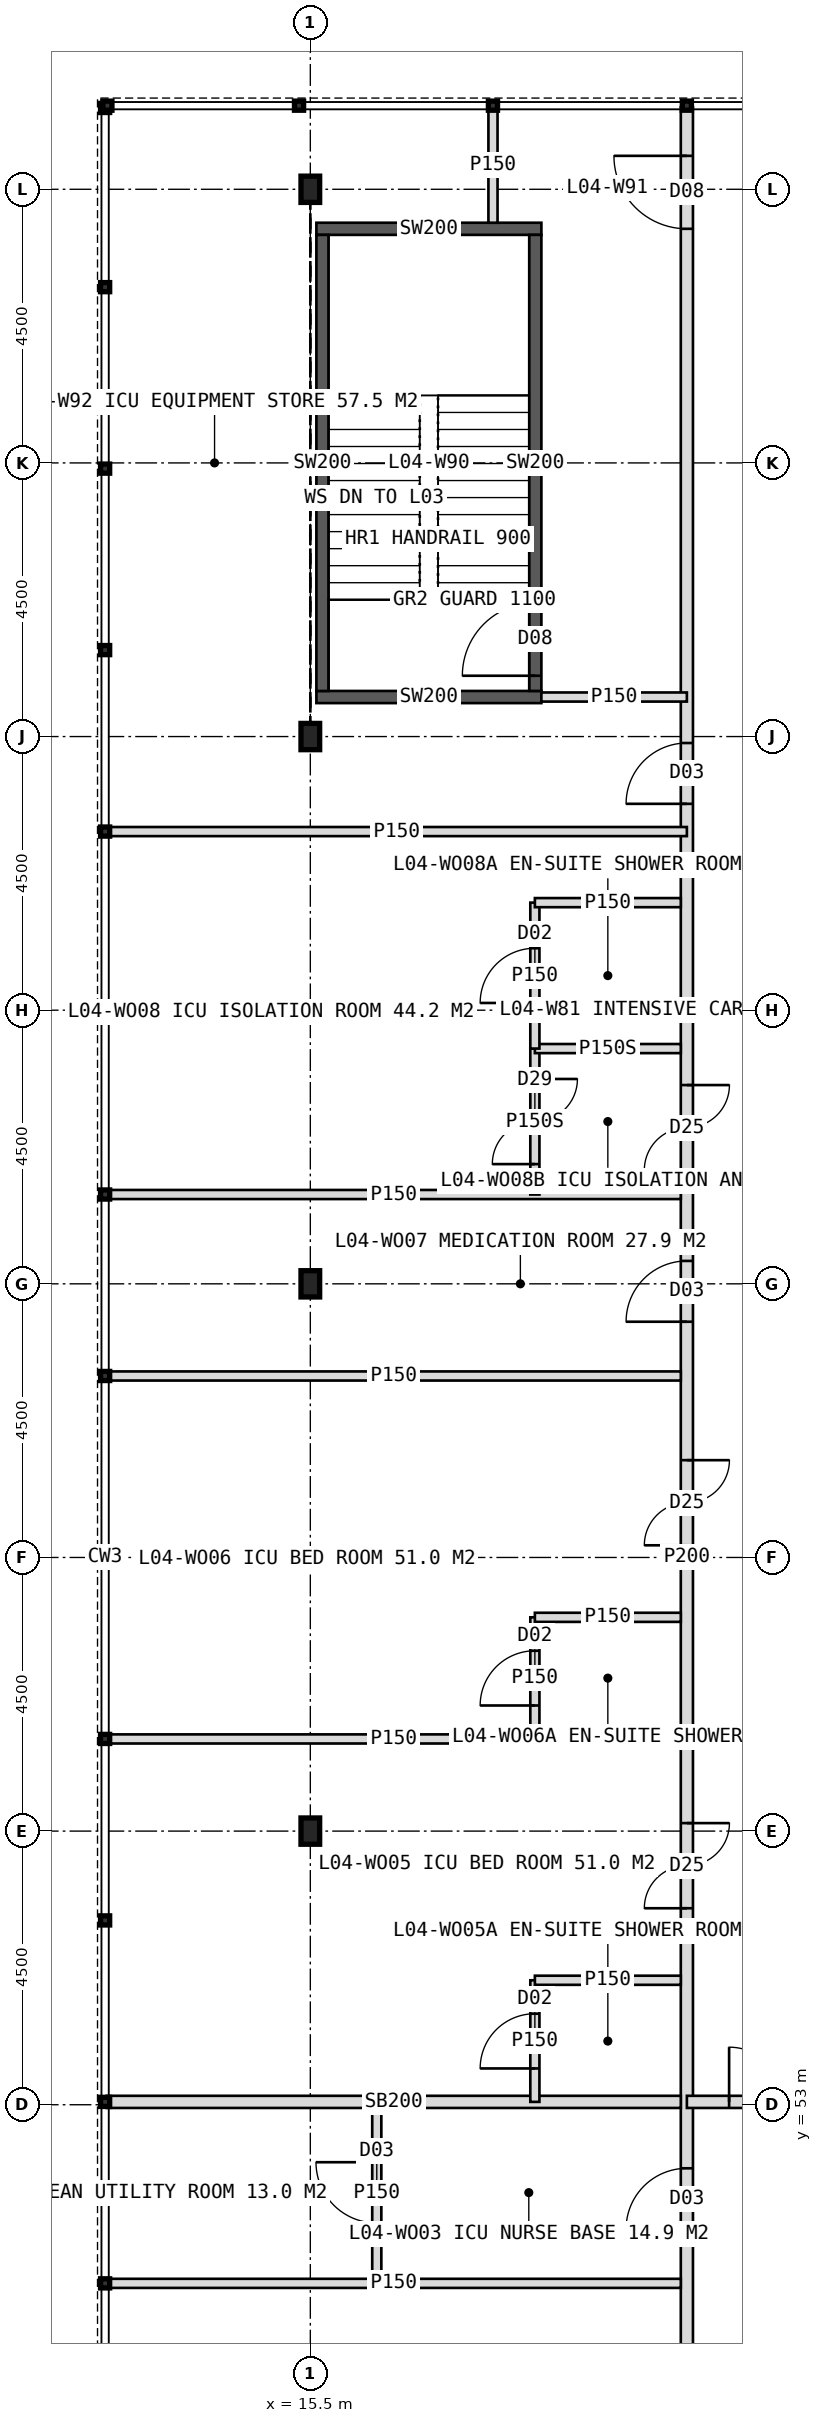
"""IFC4 building model, lengths in metres.
Left out: names, types, materials, properties, quantities, classifications, styles, units other than length and angle.
Written with IfcOpenShell. Run it as: python <this file> out.ifc"""

import sys

from ifc_helpers import new_model, si_unit, direction, frame, frame_2d, origin, origin_2d, place, context, subcontext, project, spatial, rectangle, i_section, extrude, element, fill, save


model = new_model("IFC4")
c1 = context("Model", 3, precision=1e-05, world=origin(), true_north=direction((0.0, 1.0)))
c2 = subcontext(c1, "Body", "Model", "MODEL_VIEW")
j1 = project(units=[si_unit("LENGTHUNIT", "METRE"), si_unit("PLANEANGLEUNIT", "RADIAN")], contexts=[c1])
p1 = place(None, origin())
s1 = spatial("IfcSite", under=j1, at=p1, CompositionType="ELEMENT")
p2 = place(p1, origin())
s2 = spatial("IfcBuilding", under=s1, at=p2, CompositionType="ELEMENT")
p3 = place(p2, frame((0.0, 0.0, 21.0)))
s3 = spatial("IfcBuildingStorey", under=s2, at=p3, CompositionType="ELEMENT", Elevation=21.0)
for number, where, z_axis, x_axis in (
    (1, (15.5, 57.5, 0.0), (0.0, 0.0, 1.0), (1.0, 0.0, 0.0)),
    (2, (15.5, 66.5, 0.0), (0.0, 0.0, 1.0), (1.0, 0.0, 0.0)),
    (3, (15.5, 75.5, 0.0), (0.0, 0.0, 1.0), (1.0, 0.0, 0.0)),
    (4, (15.5, 84.5, 0.0), (0.0, 0.0, 1.0), (1.0, 0.0, 0.0)),
):
    element("IfcColumn", number, at=place(p3, frame(where, z_axis=z_axis, x_axis=x_axis)), inside=s3, PredefinedType="COLUMN", context=c2, shape_type="SweptSolid", body=[
        extrude(i_section(OverallWidth=0.307, OverallDepth=0.432, WebThickness=0.021, FlangeThickness=0.04, FilletRadius=0.027, at=origin_2d()), origin(), (0.0, 0.0, 1.0), 5.0),
    ])
p4 = place(p3, frame((21.693, 38.15, 0.0), z_axis=(0.0, 0.0, 1.0), x_axis=(0.0, 1.0, 0.0)))
e5 = element("IfcWall", 5, at=p4, inside=s3, PredefinedType="PARTITIONING", context=c2, shape_type="SweptSolid", body=[
    extrude(rectangle(XDim=47.7, YDim=0.2, at=frame_2d((23.85, 0.0))), origin(), (0.0, 0.0, 1.0), 4.7),
])
p5 = place(p4, frame((45.7, 0.0, 0.0)))
e6 = element("IfcOpeningElement", 6, at=p5, cuts=e5, PredefinedType="OPENING", context=c2, shape_type="SweptSolid", body=[
    extrude(rectangle(XDim=1.2, YDim=2.1, at=frame_2d((0.6, 1.05))), frame((0.0, 0.11, 0.0), z_axis=(0.0, -1.0, 0.0), x_axis=(1.0, 0.0, 0.0)), (0.0, 0.0, 1.0), 0.22),
])
p6 = place(p4, frame((36.244, 0.0, 0.0)))
e7 = element("IfcOpeningElement", 7, at=p6, cuts=e5, PredefinedType="OPENING", context=c2, shape_type="SweptSolid", body=[
    extrude(rectangle(XDim=1.0, YDim=2.1, at=frame_2d((0.5, 1.05))), frame((0.0, 0.11, 0.0), z_axis=(0.0, -1.0, 0.0), x_axis=(1.0, 0.0, 0.0)), (0.0, 0.0, 1.0), 0.22),
])
p7 = place(p4, frame((0.5, 0.0, 0.0)))
e8 = element("IfcOpeningElement", 8, at=p7, cuts=e5, PredefinedType="OPENING", context=c2, shape_type="SweptSolid", body=[
    extrude(rectangle(XDim=1.4, YDim=2.2, at=frame_2d((0.7, 1.1))), frame((0.0, 0.11, 0.0), z_axis=(0.0, -1.0, 0.0), x_axis=(1.0, 0.0, 0.0)), (0.0, 0.0, 1.0), 0.22),
])
p8 = place(p4, frame((30.219, 0.0, 0.0)))
e9 = element("IfcOpeningElement", 9, at=p8, cuts=e5, PredefinedType="OPENING", context=c2, shape_type="SweptSolid", body=[
    extrude(rectangle(XDim=1.4, YDim=2.2, at=frame_2d((0.7, 1.1))), frame((0.0, 0.11, 0.0), z_axis=(0.0, -1.0, 0.0), x_axis=(1.0, 0.0, 0.0)), (0.0, 0.0, 1.0), 0.22),
])
p9 = place(p4, frame((9.128, 0.0, 0.0)))
e10 = element("IfcOpeningElement", 10, at=p9, cuts=e5, PredefinedType="OPENING", context=c2, shape_type="SweptSolid", body=[
    extrude(rectangle(XDim=1.4, YDim=2.2, at=frame_2d((0.7, 1.1))), frame((0.0, 0.11, 0.0), z_axis=(0.0, -1.0, 0.0), x_axis=(1.0, 0.0, 0.0)), (0.0, 0.0, 1.0), 0.22),
])
p10 = place(p4, frame((12.805, 0.0, 0.0)))
e11 = element("IfcOpeningElement", 11, at=p10, cuts=e5, PredefinedType="OPENING", context=c2, shape_type="SweptSolid", body=[
    extrude(rectangle(XDim=1.0, YDim=2.1, at=frame_2d((0.5, 1.05))), frame((0.0, 0.11, 0.0), z_axis=(0.0, -1.0, 0.0), x_axis=(1.0, 0.0, 0.0)), (0.0, 0.0, 1.0), 0.22),
])
p11 = place(p4, frame((18.081, 0.0, 0.0)))
e12 = element("IfcOpeningElement", 12, at=p11, cuts=e5, PredefinedType="OPENING", context=c2, shape_type="SweptSolid", body=[
    extrude(rectangle(XDim=1.4, YDim=2.2, at=frame_2d((0.7, 1.1))), frame((0.0, 0.11, 0.0), z_axis=(0.0, -1.0, 0.0), x_axis=(1.0, 0.0, 0.0)), (0.0, 0.0, 1.0), 0.22),
])
p12 = place(p4, frame((24.05, 0.0, 0.0)))
e13 = element("IfcOpeningElement", 13, at=p12, cuts=e5, PredefinedType="OPENING", context=c2, shape_type="SweptSolid", body=[
    extrude(rectangle(XDim=1.4, YDim=2.2, at=frame_2d((0.7, 1.1))), frame((0.0, 0.11, 0.0), z_axis=(0.0, -1.0, 0.0), x_axis=(1.0, 0.0, 0.0)), (0.0, 0.0, 1.0), 0.22),
])
p13 = place(p4, frame((27.727, 0.0, 0.0)))
e14 = element("IfcOpeningElement", 14, at=p13, cuts=e5, PredefinedType="OPENING", context=c2, shape_type="SweptSolid", body=[
    extrude(rectangle(XDim=1.0, YDim=2.1, at=frame_2d((0.5, 1.05))), frame((0.0, 0.11, 0.0), z_axis=(0.0, -1.0, 0.0), x_axis=(1.0, 0.0, 0.0)), (0.0, 0.0, 1.0), 0.22),
])
p14 = place(p3, frame((21.693, 53.047, 0.0), z_axis=(0.0, 0.0, 1.0), x_axis=(1.0, 0.0, 0.0)))
e15 = element("IfcWall", 15, at=p14, inside=s3, PredefinedType="SOLIDWALL", context=c2, shape_type="SweptSolid", body=[
    extrude(rectangle(XDim=3.189, YDim=0.2, at=frame_2d((1.594, 0.0))), origin(), (0.0, 0.0, 1.0), 4.7),
])
p15 = place(p14, frame((0.695, 0.0, 0.0)))
e16 = element("IfcOpeningElement", 16, at=p15, cuts=e15, PredefinedType="OPENING", context=c2, shape_type="SweptSolid", body=[
    extrude(rectangle(XDim=1.8, YDim=2.2, at=frame_2d((0.9, 1.1))), frame((0.0, 0.11, 0.0), z_axis=(0.0, -1.0, 0.0), x_axis=(1.0, 0.0, 0.0)), (0.0, 0.0, 1.0), 0.22),
])
for number, where, z_axis, x_axis in (
    (17, (15.6, 76.15, 0.0), (0.0, 0.0, 1.0), (1.0, 0.0, 0.0)),
    (18, (15.6, 83.85, 0.0), (0.0, 0.0, 1.0), (1.0, 0.0, 0.0)),
):
    element("IfcWall", number, at=place(p3, frame(where, z_axis=z_axis, x_axis=x_axis)), inside=s3, PredefinedType="SOLIDWALL", context=c2, shape_type="SweptSolid", body=[
        extrude(rectangle(XDim=3.7, YDim=0.2, at=frame_2d((1.85, 0.0))), origin(), (0.0, 0.0, 1.0), 4.7),
    ])
p16 = place(p3, frame((15.7, 76.25, 0.0), z_axis=(0.0, 0.0, 1.0), x_axis=(0.0, 1.0, 0.0)))
e19 = element("IfcWall", 19, at=p16, inside=s3, PredefinedType="SOLIDWALL", context=c2, shape_type="SweptSolid", body=[
    extrude(rectangle(XDim=7.5, YDim=0.2, at=frame_2d((3.75, 0.0))), origin(), (0.0, 0.0, 1.0), 4.7),
])
p17 = place(p3, frame((19.2, 76.25, 0.0), z_axis=(0.0, 0.0, 1.0), x_axis=(0.0, 1.0, 0.0)))
e20 = element("IfcWall", 20, at=p17, inside=s3, PredefinedType="SOLIDWALL", context=c2, shape_type="SweptSolid", body=[
    extrude(rectangle(XDim=7.5, YDim=0.2, at=frame_2d((3.75, 0.0))), origin(), (0.0, 0.0, 1.0), 4.7),
])
p18 = place(p17, frame((0.25, 0.0, 0.0)))
e21 = element("IfcOpeningElement", 21, at=p18, cuts=e20, PredefinedType="OPENING", context=c2, shape_type="SweptSolid", body=[
    extrude(rectangle(XDim=1.2, YDim=2.1, at=frame_2d((0.6, 1.05))), frame((0.0, 0.11, 0.0), z_axis=(0.0, -1.0, 0.0), x_axis=(1.0, 0.0, 0.0)), (0.0, 0.0, 1.0), 0.22),
])
p19 = place(p3, frame((19.3, 76.15, 0.0), z_axis=(0.0, 0.0, 1.0), x_axis=(1.0, 0.0, 0.0)))
e22 = element("IfcWall", 22, at=p19, inside=s3, PredefinedType="PARTITIONING", context=c2, shape_type="SweptSolid", body=[
    extrude(rectangle(XDim=2.393, YDim=0.15, at=frame_2d((1.197, 0.0))), origin(), (0.0, 0.0, 1.0), 4.7),
])
p20 = place(p3, frame((18.504, 83.95, 0.0), z_axis=(0.0, 0.0, 1.0), x_axis=(0.0, 1.0, 0.0)))
e23 = element("IfcWall", 23, at=p20, inside=s3, PredefinedType="PARTITIONING", context=c2, shape_type="SweptSolid", body=[
    extrude(rectangle(XDim=1.9, YDim=0.15, at=frame_2d((0.95, 0.0))), origin(), (0.0, 0.0, 1.0), 4.7),
])
p21 = place(p3, frame((12.15, 73.938, 0.0), z_axis=(0.0, 0.0, 1.0), x_axis=(1.0, 0.0, 0.0)))
e24 = element("IfcWall", 24, at=p21, inside=s3, PredefinedType="PARTITIONING", context=c2, shape_type="SweptSolid", body=[
    extrude(rectangle(XDim=9.543, YDim=0.15, at=frame_2d((4.771, 0.0))), origin(), (0.0, 0.0, 1.0), 4.7),
])
p22 = place(p3, frame((12.15, 50.062, 0.0), z_axis=(0.0, 0.0, 1.0), x_axis=(1.0, 0.0, 0.0)))
e25 = element("IfcWall", 25, at=p22, inside=s3, PredefinedType="PARTITIONING", context=c2, shape_type="SweptSolid", body=[
    extrude(rectangle(XDim=9.443, YDim=0.15, at=frame_2d((4.722, 0.0))), origin(), (0.0, 0.0, 1.0), 4.7),
])
p23 = place(p3, frame((12.15, 53.047, 0.0), z_axis=(0.0, 0.0, 1.0), x_axis=(1.0, 0.0, 0.0)))
e26 = element("IfcWall", 26, at=p23, inside=s3, PredefinedType="SOLIDWALL", context=c2, shape_type="SweptSolid", body=[
    extrude(rectangle(XDim=9.443, YDim=0.2, at=frame_2d((4.722, 0.0))), origin(), (0.0, 0.0, 1.0), 4.7),
])
for number, where, z_axis, x_axis in (
    (27, (12.15, 59.016, 0.0), (0.0, 0.0, 1.0), (1.0, 0.0, 0.0)),
    (28, (12.15, 64.984, 0.0), (0.0, 0.0, 1.0), (1.0, 0.0, 0.0)),
    (29, (12.15, 67.969, 0.0), (0.0, 0.0, 1.0), (1.0, 0.0, 0.0)),
):
    element("IfcWall", number, at=place(p3, frame(where, z_axis=z_axis, x_axis=x_axis)), inside=s3, PredefinedType="PARTITIONING", context=c2, shape_type="SweptSolid", body=[
        extrude(rectangle(XDim=9.443, YDim=0.15, at=frame_2d((4.722, 0.0))), origin(), (0.0, 0.0, 1.0), 4.7),
    ])
p24 = place(p3, frame((16.593, 50.062, 0.0), z_axis=(0.0, 0.0, 1.0), x_axis=(0.0, 1.0, 0.0)))
e30 = element("IfcWall", 30, at=p24, inside=s3, PredefinedType="PARTITIONING", context=c2, shape_type="SweptSolid", body=[
    extrude(rectangle(XDim=2.984, YDim=0.15, at=frame_2d((1.492, 0.0))), origin(), (0.0, 0.0, 1.0), 4.7),
])
p25 = place(p24, frame((0.992, 0.0, 0.0)))
e31 = element("IfcOpeningElement", 31, at=p25, cuts=e30, PredefinedType="OPENING", context=c2, shape_type="SweptSolid", body=[
    extrude(rectangle(XDim=1.0, YDim=2.1, at=frame_2d((0.5, 1.05))), frame((0.0, 0.085, 0.0), z_axis=(0.0, -1.0, 0.0), x_axis=(1.0, 0.0, 0.0)), (0.0, 0.0, 1.0), 0.17),
])
p26 = place(p3, frame((19.193, 53.047, 0.0), z_axis=(0.0, 0.0, 1.0), x_axis=(0.0, 1.0, 0.0)))
e32 = element("IfcWall", 32, at=p26, inside=s3, PredefinedType="PARTITIONING", context=c2, shape_type="SweptSolid", body=[
    extrude(rectangle(XDim=2.0, YDim=0.15, at=frame_2d((1.0, 0.0))), origin(), (0.0, 0.0, 1.0), 4.7),
])
p27 = place(p26, frame((0.55, 0.0, 0.0)))
e33 = element("IfcOpeningElement", 33, at=p27, cuts=e32, PredefinedType="OPENING", context=c2, shape_type="SweptSolid", body=[
    extrude(rectangle(XDim=0.9, YDim=2.1, at=frame_2d((0.45, 1.05))), frame((0.0, 0.085, 0.0), z_axis=(0.0, -1.0, 0.0), x_axis=(1.0, 0.0, 0.0)), (0.0, 0.0, 1.0), 0.17),
])
p28 = place(p3, frame((21.593, 55.047, 0.0), z_axis=(0.0, 0.0, 1.0), x_axis=(-1.0, 0.0, 0.0)))
e34 = element("IfcWall", 34, at=p28, inside=s3, PredefinedType="PARTITIONING", context=c2, shape_type="SweptSolid", body=[
    extrude(rectangle(XDim=2.4, YDim=0.15, at=frame_2d((1.2, 0.0))), origin(), (0.0, 0.0, 1.0), 4.7),
])
p29 = place(p3, frame((19.193, 59.016, 0.0), z_axis=(0.0, 0.0, 1.0), x_axis=(0.0, 1.0, 0.0)))
e35 = element("IfcWall", 35, at=p29, inside=s3, PredefinedType="PARTITIONING", context=c2, shape_type="SweptSolid", body=[
    extrude(rectangle(XDim=2.0, YDim=0.15, at=frame_2d((1.0, 0.0))), origin(), (0.0, 0.0, 1.0), 4.7),
])
p30 = place(p29, frame((0.55, 0.0, 0.0)))
e36 = element("IfcOpeningElement", 36, at=p30, cuts=e35, PredefinedType="OPENING", context=c2, shape_type="SweptSolid", body=[
    extrude(rectangle(XDim=0.9, YDim=2.1, at=frame_2d((0.45, 1.05))), frame((0.0, 0.085, 0.0), z_axis=(0.0, -1.0, 0.0), x_axis=(1.0, 0.0, 0.0)), (0.0, 0.0, 1.0), 0.17),
])
p31 = place(p3, frame((21.593, 61.016, 0.0), z_axis=(0.0, 0.0, 1.0), x_axis=(-1.0, 0.0, 0.0)))
e37 = element("IfcWall", 37, at=p31, inside=s3, PredefinedType="PARTITIONING", context=c2, shape_type="SweptSolid", body=[
    extrude(rectangle(XDim=2.4, YDim=0.15, at=frame_2d((1.2, 0.0))), origin(), (0.0, 0.0, 1.0), 4.7),
])
p32 = place(p3, frame((19.193, 67.969, 0.0), z_axis=(0.0, 0.0, 1.0), x_axis=(0.0, 1.0, 0.0)))
e38 = element("IfcWall", 38, at=p32, inside=s3, PredefinedType="PARTITIONING", context=c2, shape_type="SweptSolid", body=[
    extrude(rectangle(XDim=2.4, YDim=0.15, at=frame_2d((1.2, 0.0))), origin(), (0.0, 0.0, 1.0), 4.7),
])
p33 = place(p32, frame((0.5, 0.0, 0.0)))
e39 = element("IfcOpeningElement", 39, at=p33, cuts=e38, PredefinedType="OPENING", context=c2, shape_type="SweptSolid", body=[
    extrude(rectangle(XDim=1.4, YDim=2.2, at=frame_2d((0.7, 1.1))), frame((0.0, 0.085, 0.0), z_axis=(0.0, -1.0, 0.0), x_axis=(1.0, 0.0, 0.0)), (0.0, 0.0, 1.0), 0.17),
])
p34 = place(p3, frame((21.593, 70.369, 0.0), z_axis=(0.0, 0.0, 1.0), x_axis=(-1.0, 0.0, 0.0)))
e40 = element("IfcWall", 40, at=p34, inside=s3, PredefinedType="PARTITIONING", context=c2, shape_type="SweptSolid", body=[
    extrude(rectangle(XDim=2.4, YDim=0.15, at=frame_2d((1.2, 0.0))), origin(), (0.0, 0.0, 1.0), 4.7),
])
p35 = place(p3, frame((19.193, 70.369, 0.0), z_axis=(0.0, 0.0, 1.0), x_axis=(0.0, 1.0, 0.0)))
e41 = element("IfcWall", 41, at=p35, inside=s3, PredefinedType="PARTITIONING", context=c2, shape_type="SweptSolid", body=[
    extrude(rectangle(XDim=2.4, YDim=0.15, at=frame_2d((1.2, 0.0))), origin(), (0.0, 0.0, 1.0), 4.7),
])
p36 = place(p35, frame((0.75, 0.0, 0.0)))
e42 = element("IfcOpeningElement", 42, at=p36, cuts=e41, PredefinedType="OPENING", context=c2, shape_type="SweptSolid", body=[
    extrude(rectangle(XDim=0.9, YDim=2.1, at=frame_2d((0.45, 1.05))), frame((0.0, 0.085, 0.0), z_axis=(0.0, -1.0, 0.0), x_axis=(1.0, 0.0, 0.0)), (0.0, 0.0, 1.0), 0.17),
])
p37 = place(p3, frame((21.593, 72.769, 0.0), z_axis=(0.0, 0.0, 1.0), x_axis=(-1.0, 0.0, 0.0)))
e43 = element("IfcWall", 43, at=p37, inside=s3, PredefinedType="PARTITIONING", context=c2, shape_type="SweptSolid", body=[
    extrude(rectangle(XDim=2.4, YDim=0.15, at=frame_2d((1.2, 0.0))), origin(), (0.0, 0.0, 1.0), 4.7),
])
p38 = place(p15, origin())
e44 = element("IfcDoor", 44, at=p38, inside=s3, OperationType="DOUBLE_DOOR_DOUBLE_SWING", PredefinedType="DOOR", context=c2, shape_type="SweptSolid", body=[
    extrude(rectangle(XDim=1.8, YDim=2.2, at=frame_2d((0.9, 1.1))), frame((0.0, 0.025, 0.0), z_axis=(0.0, -1.0, 0.0), x_axis=(1.0, 0.0, 0.0)), (0.0, 0.0, 1.0), 0.05),
])
fill(e16, e44)
p39 = place(p18, origin())
e45 = element("IfcDoor", 45, at=p39, inside=s3, OperationType="SINGLE_SWING_LEFT", PredefinedType="DOOR", context=c2, shape_type="SweptSolid", body=[
    extrude(rectangle(XDim=1.2, YDim=2.1, at=frame_2d((0.6, 1.05))), frame((0.0, 0.025, 0.0), z_axis=(0.0, -1.0, 0.0), x_axis=(1.0, 0.0, 0.0)), (0.0, 0.0, 1.0), 0.05),
])
fill(e21, e45)
p40 = place(p5, origin())
e46 = element("IfcDoor", 46, at=p40, inside=s3, OperationType="SINGLE_SWING_RIGHT", PredefinedType="DOOR", context=c2, shape_type="SweptSolid", body=[
    extrude(rectangle(XDim=1.2, YDim=2.1, at=frame_2d((0.6, 1.05))), frame((0.0, 0.025, 0.0), z_axis=(0.0, -1.0, 0.0), x_axis=(1.0, 0.0, 0.0)), (0.0, 0.0, 1.0), 0.05),
])
fill(e6, e46)
p41 = place(p6, origin())
e47 = element("IfcDoor", 47, at=p41, inside=s3, OperationType="SINGLE_SWING_LEFT", PredefinedType="DOOR", context=c2, shape_type="SweptSolid", body=[
    extrude(rectangle(XDim=1.0, YDim=2.1, at=frame_2d((0.5, 1.05))), frame((0.0, 0.025, 0.0), z_axis=(0.0, -1.0, 0.0), x_axis=(1.0, 0.0, 0.0)), (0.0, 0.0, 1.0), 0.05),
])
fill(e7, e47)
p42 = place(p27, origin())
e48 = element("IfcDoor", 48, at=p42, inside=s3, OperationType="SINGLE_SWING_LEFT", PredefinedType="DOOR", context=c2, shape_type="SweptSolid", body=[
    extrude(rectangle(XDim=0.9, YDim=2.1, at=frame_2d((0.45, 1.05))), frame((0.0, 0.025, 0.0), z_axis=(0.0, -1.0, 0.0), x_axis=(1.0, 0.0, 0.0)), (0.0, 0.0, 1.0), 0.05),
])
fill(e33, e48)
p43 = place(p30, origin())
e49 = element("IfcDoor", 49, at=p43, inside=s3, OperationType="SINGLE_SWING_LEFT", PredefinedType="DOOR", context=c2, shape_type="SweptSolid", body=[
    extrude(rectangle(XDim=0.9, YDim=2.1, at=frame_2d((0.45, 1.05))), frame((0.0, 0.025, 0.0), z_axis=(0.0, -1.0, 0.0), x_axis=(1.0, 0.0, 0.0)), (0.0, 0.0, 1.0), 0.05),
])
fill(e36, e49)
p44 = place(p33, origin())
e50 = element("IfcDoor", 50, at=p44, inside=s3, OperationType="DOUBLE_DOOR_SINGLE_SWING", PredefinedType="DOOR", context=c2, shape_type="SweptSolid", body=[
    extrude(rectangle(XDim=1.4, YDim=2.2, at=frame_2d((0.7, 1.1))), frame((0.0, 0.025, 0.0), z_axis=(0.0, -1.0, 0.0), x_axis=(1.0, 0.0, 0.0)), (0.0, 0.0, 1.0), 0.05),
])
fill(e39, e50)
p45 = place(p8, origin())
e51 = element("IfcDoor", 51, at=p45, inside=s3, OperationType="DOUBLE_DOOR_SINGLE_SWING", PredefinedType="DOOR", context=c2, shape_type="SweptSolid", body=[
    extrude(rectangle(XDim=1.4, YDim=2.2, at=frame_2d((0.7, 1.1))), frame((0.0, 0.025, 0.0), z_axis=(0.0, -1.0, 0.0), x_axis=(1.0, 0.0, 0.0)), (0.0, 0.0, 1.0), 0.05),
])
fill(e9, e51)
p46 = place(p36, origin())
e52 = element("IfcDoor", 52, at=p46, inside=s3, OperationType="SINGLE_SWING_LEFT", PredefinedType="DOOR", context=c2, shape_type="SweptSolid", body=[
    extrude(rectangle(XDim=0.9, YDim=2.1, at=frame_2d((0.45, 1.05))), frame((0.0, 0.025, 0.0), z_axis=(0.0, -1.0, 0.0), x_axis=(1.0, 0.0, 0.0)), (0.0, 0.0, 1.0), 0.05),
])
fill(e42, e52)
p47 = place(p10, origin())
e53 = element("IfcDoor", 53, at=p47, inside=s3, OperationType="SINGLE_SWING_LEFT", PredefinedType="DOOR", context=c2, shape_type="SweptSolid", body=[
    extrude(rectangle(XDim=1.0, YDim=2.1, at=frame_2d((0.5, 1.05))), frame((0.0, 0.025, 0.0), z_axis=(0.0, -1.0, 0.0), x_axis=(1.0, 0.0, 0.0)), (0.0, 0.0, 1.0), 0.05),
])
fill(e11, e53)
p48 = place(p25, origin())
e54 = element("IfcDoor", 54, at=p48, inside=s3, OperationType="SINGLE_SWING_RIGHT", PredefinedType="DOOR", context=c2, shape_type="SweptSolid", body=[
    extrude(rectangle(XDim=1.0, YDim=2.1, at=frame_2d((0.5, 1.05))), frame((0.0, 0.025, 0.0), z_axis=(0.0, -1.0, 0.0), x_axis=(1.0, 0.0, 0.0)), (0.0, 0.0, 1.0), 0.05),
])
fill(e31, e54)
p49 = place(p11, origin())
e55 = element("IfcDoor", 55, at=p49, inside=s3, OperationType="DOUBLE_DOOR_SINGLE_SWING", PredefinedType="DOOR", context=c2, shape_type="SweptSolid", body=[
    extrude(rectangle(XDim=1.4, YDim=2.2, at=frame_2d((0.7, 1.1))), frame((0.0, 0.025, 0.0), z_axis=(0.0, -1.0, 0.0), x_axis=(1.0, 0.0, 0.0)), (0.0, 0.0, 1.0), 0.05),
])
fill(e12, e55)
p50 = place(p12, origin())
e56 = element("IfcDoor", 56, at=p50, inside=s3, OperationType="DOUBLE_DOOR_SINGLE_SWING", PredefinedType="DOOR", context=c2, shape_type="SweptSolid", body=[
    extrude(rectangle(XDim=1.4, YDim=2.2, at=frame_2d((0.7, 1.1))), frame((0.0, 0.025, 0.0), z_axis=(0.0, -1.0, 0.0), x_axis=(1.0, 0.0, 0.0)), (0.0, 0.0, 1.0), 0.05),
])
fill(e13, e56)
p51 = place(p13, origin())
e57 = element("IfcDoor", 57, at=p51, inside=s3, OperationType="SINGLE_SWING_LEFT", PredefinedType="DOOR", context=c2, shape_type="SweptSolid", body=[
    extrude(rectangle(XDim=1.0, YDim=2.1, at=frame_2d((0.5, 1.05))), frame((0.0, 0.025, 0.0), z_axis=(0.0, -1.0, 0.0), x_axis=(1.0, 0.0, 0.0)), (0.0, 0.0, 1.0), 0.05),
])
fill(e14, e57)
save(model, sys.argv[1])
